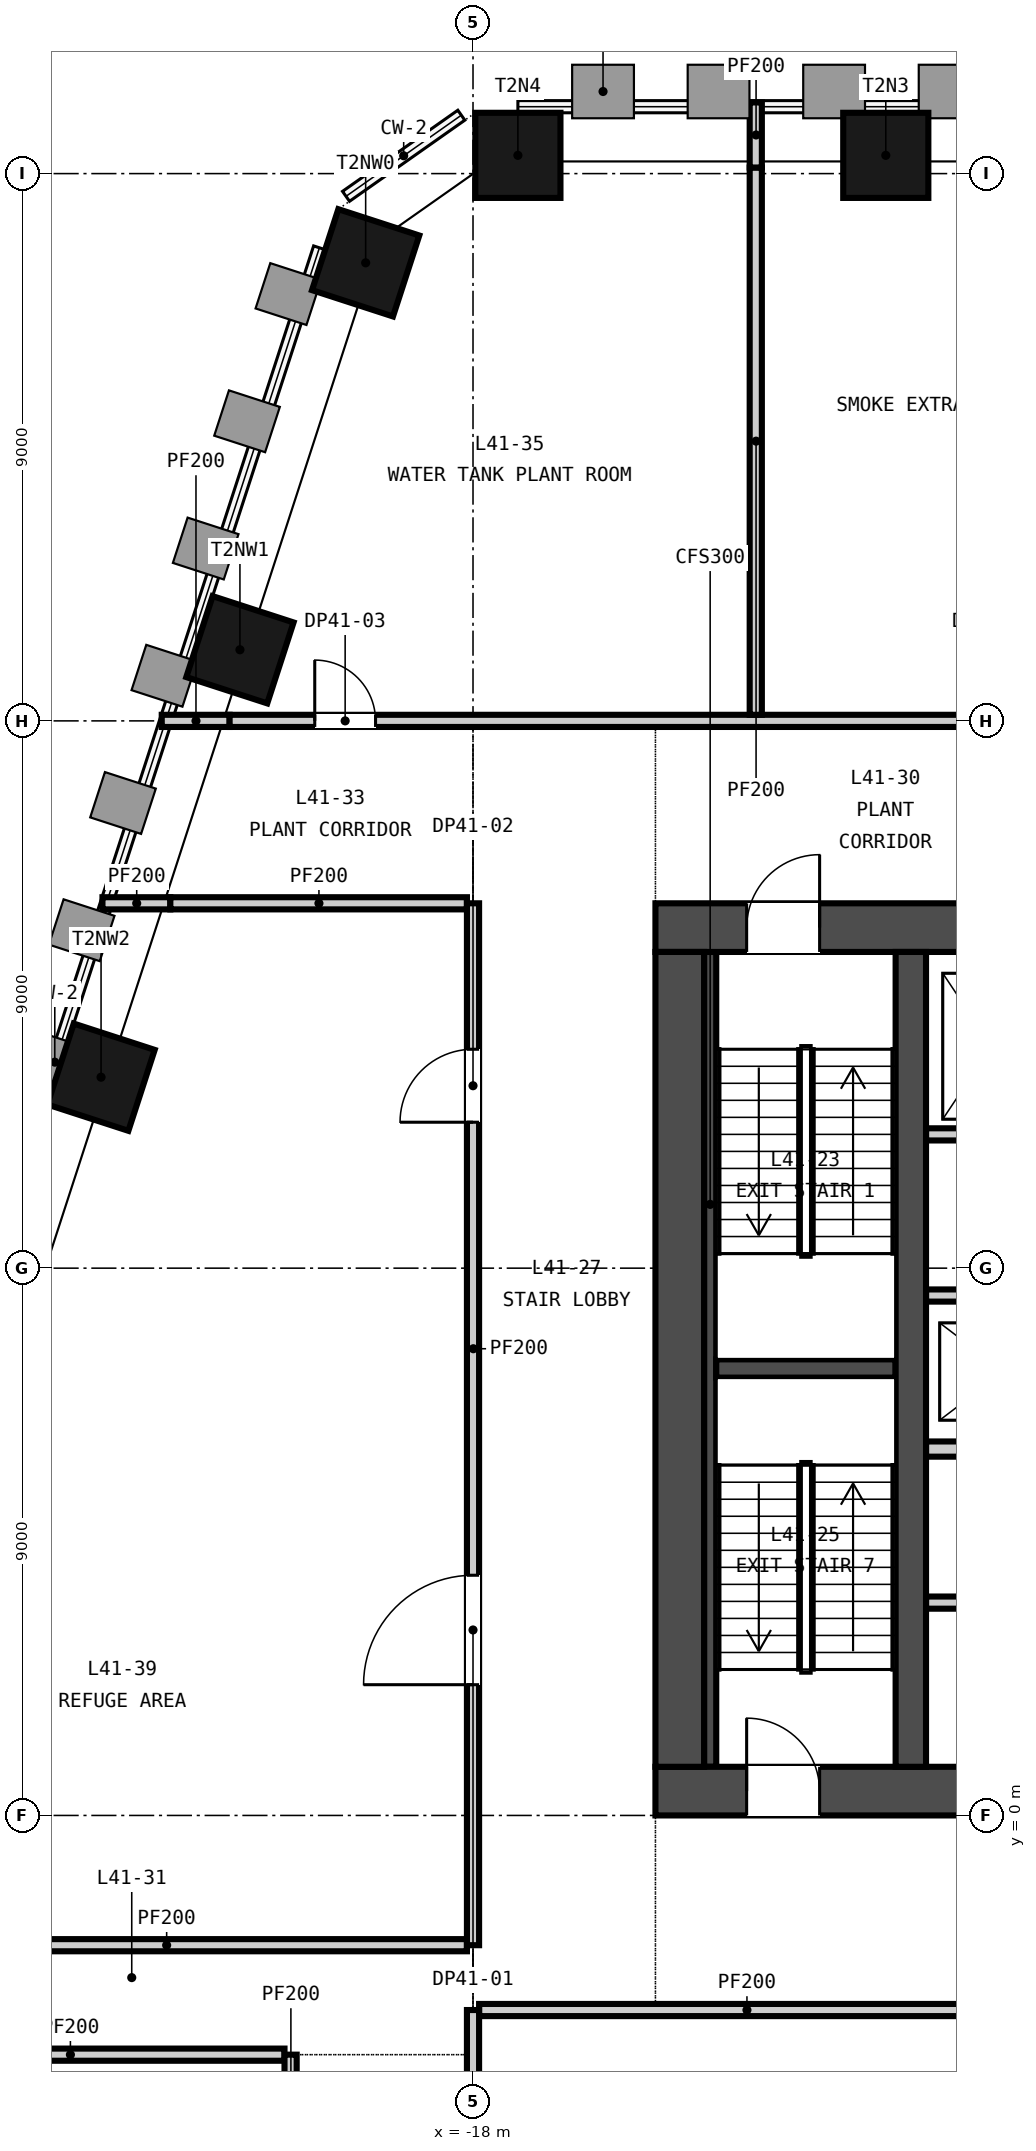
"""IFC4 building model, lengths in metres.
Left out: names, types, materials, properties, quantities, classifications, styles, units other than length and angle.
Written with IfcOpenShell. Run it as: python <this file> out.ifc"""

import sys

from ifc_helpers import new_model, si_unit, direction, frame, frame_2d, origin, origin_2d, place, context, subcontext, project, spatial, rectangle, extrude, element, fill, save


model = new_model("IFC4")
c1 = context("Model", 3, precision=1e-05, world=origin(), true_north=direction((0.0, 1.0)))
c2 = subcontext(c1, "Body", "Model", "MODEL_VIEW")
j1 = project(units=[si_unit("LENGTHUNIT", "METRE"), si_unit("PLANEANGLEUNIT", "RADIAN")], contexts=[c1])
p1 = place(None, origin())
s1 = spatial("IfcSite", under=j1, at=p1, CompositionType="ELEMENT")
p2 = place(p1, origin())
s2 = spatial("IfcBuilding", under=s1, at=p2, CompositionType="ELEMENT")
p3 = place(p2, frame((0.0, 0.0, 166.3)))
s3 = spatial("IfcBuildingStorey", under=s2, at=p3, CompositionType="ELEMENT", Elevation=166.3)
p4 = place(p3, frame((-15.0, 0.4, -0.3), z_axis=(0.0, 0.0, 1.0), x_axis=(1.0, 0.0, 0.0)))
e1 = element("IfcWall", 1, at=p4, inside=s3, PredefinedType="SOLIDWALL", context=c2, shape_type="SweptSolid", body=[
    extrude(rectangle(XDim=30.0, YDim=0.8, at=frame_2d((15.0, 0.0))), origin(), (0.0, 0.0, 1.0), 4.65),
])
p5 = place(p4, frame((5.8, 0.0, 0.3)))
e2 = element("IfcOpeningElement", 2, at=p5, cuts=e1, PredefinedType="OPENING", context=c2, shape_type="SweptSolid", body=[
    extrude(rectangle(XDim=2.4, YDim=2.4, at=frame_2d((1.2, 1.2))), frame((0.0, 0.41, 0.0), z_axis=(0.0, -1.0, 0.0), x_axis=(1.0, 0.0, 0.0)), (0.0, 0.0, 1.0), 0.82),
])
p6 = place(p4, frame((13.8, 0.0, 0.3)))
e3 = element("IfcOpeningElement", 3, at=p6, cuts=e1, PredefinedType="OPENING", context=c2, shape_type="SweptSolid", body=[
    extrude(rectangle(XDim=2.4, YDim=2.4, at=frame_2d((1.2, 1.2))), frame((0.0, 0.41, 0.0), z_axis=(0.0, -1.0, 0.0), x_axis=(1.0, 0.0, 0.0)), (0.0, 0.0, 1.0), 0.82),
])
p7 = place(p4, frame((21.8, 0.0, 0.3)))
e4 = element("IfcOpeningElement", 4, at=p7, cuts=e1, PredefinedType="OPENING", context=c2, shape_type="SweptSolid", body=[
    extrude(rectangle(XDim=2.4, YDim=2.4, at=frame_2d((1.2, 1.2))), frame((0.0, 0.41, 0.0), z_axis=(0.0, -1.0, 0.0), x_axis=(1.0, 0.0, 0.0)), (0.0, 0.0, 1.0), 0.82),
])
p8 = place(p4, frame((1.5, 0.0, 0.3)))
e5 = element("IfcOpeningElement", 5, at=p8, cuts=e1, PredefinedType="OPENING", context=c2, shape_type="SweptSolid", body=[
    extrude(rectangle(XDim=1.2, YDim=2.1, at=frame_2d((0.6, 1.05))), frame((0.0, 0.41, 0.0), z_axis=(0.0, -1.0, 0.0), x_axis=(1.0, 0.0, 0.0)), (0.0, 0.0, 1.0), 0.82),
])
p9 = place(p4, frame((27.3, 0.0, 0.3)))
e6 = element("IfcOpeningElement", 6, at=p9, cuts=e1, PredefinedType="OPENING", context=c2, shape_type="SweptSolid", body=[
    extrude(rectangle(XDim=1.2, YDim=2.1, at=frame_2d((0.6, 1.05))), frame((0.0, 0.41, 0.0), z_axis=(0.0, -1.0, 0.0), x_axis=(1.0, 0.0, 0.0)), (0.0, 0.0, 1.0), 0.82),
])
p10 = place(p3, frame((-15.0, 14.6, -0.3), z_axis=(0.0, 0.0, 1.0), x_axis=(1.0, 0.0, 0.0)))
e7 = element("IfcWall", 7, at=p10, inside=s3, PredefinedType="SOLIDWALL", context=c2, shape_type="SweptSolid", body=[
    extrude(rectangle(XDim=30.0, YDim=0.8, at=frame_2d((15.0, 0.0))), origin(), (0.0, 0.0, 1.0), 4.65),
])
p11 = place(p10, frame((9.25, 0.0, 0.3)))
e8 = element("IfcOpeningElement", 8, at=p11, cuts=e7, PredefinedType="OPENING", context=c2, shape_type="SweptSolid", body=[
    extrude(rectangle(XDim=1.5, YDim=2.1, at=frame_2d((0.75, 1.05))), frame((0.0, 0.41, 0.0), z_axis=(0.0, -1.0, 0.0), x_axis=(1.0, 0.0, 0.0)), (0.0, 0.0, 1.0), 0.82),
])
p12 = place(p10, frame((19.4, 0.0, 0.3)))
e9 = element("IfcOpeningElement", 9, at=p12, cuts=e7, PredefinedType="OPENING", context=c2, shape_type="SweptSolid", body=[
    extrude(rectangle(XDim=1.5, YDim=2.1, at=frame_2d((0.75, 1.05))), frame((0.0, 0.41, 0.0), z_axis=(0.0, -1.0, 0.0), x_axis=(1.0, 0.0, 0.0)), (0.0, 0.0, 1.0), 0.82),
])
p13 = place(p10, frame((1.5, 0.0, 0.3)))
e10 = element("IfcOpeningElement", 10, at=p13, cuts=e7, PredefinedType="OPENING", context=c2, shape_type="SweptSolid", body=[
    extrude(rectangle(XDim=1.2, YDim=2.1, at=frame_2d((0.6, 1.05))), frame((0.0, 0.41, 0.0), z_axis=(0.0, -1.0, 0.0), x_axis=(1.0, 0.0, 0.0)), (0.0, 0.0, 1.0), 0.82),
])
p14 = place(p10, frame((27.3, 0.0, 0.3)))
e11 = element("IfcOpeningElement", 11, at=p14, cuts=e7, PredefinedType="OPENING", context=c2, shape_type="SweptSolid", body=[
    extrude(rectangle(XDim=1.2, YDim=2.1, at=frame_2d((0.6, 1.05))), frame((0.0, 0.41, 0.0), z_axis=(0.0, -1.0, 0.0), x_axis=(1.0, 0.0, 0.0)), (0.0, 0.0, 1.0), 0.82),
])
p15 = place(p3, frame((-14.6, 0.8, -0.3), z_axis=(0.0, 0.0, 1.0), x_axis=(0.0, 1.0, 0.0)))
e12 = element("IfcWall", 12, at=p15, inside=s3, PredefinedType="SOLIDWALL", context=c2, shape_type="SweptSolid", body=[
    extrude(rectangle(XDim=13.4, YDim=0.8, at=frame_2d((6.7, 0.0))), origin(), (0.0, 0.0, 1.0), 4.65),
])
p16 = place(p3, frame((-10.8, 0.8, -0.3), z_axis=(0.0, 0.0, 1.0), x_axis=(0.0, 1.0, 0.0)))
e13 = element("IfcWall", 13, at=p16, inside=s3, PredefinedType="SOLIDWALL", context=c2, shape_type="SweptSolid", body=[
    extrude(rectangle(XDim=13.4, YDim=0.5, at=frame_2d((6.7, 0.0))), origin(), (0.0, 0.0, 1.0), 4.65),
])
for number, where, z_axis, x_axis in (
    (14, (-11.212, 27.3, -0.3), (0.0, 0.0, 1.0), (-1.0, 0.0, 0.0)),
    (15, (-17.262, 27.3, -0.3), (0.0, 0.0, 1.0), (-1.0, 0.0, 0.0)),
    (16, (-19.765, 25.533, -0.3), (0.0, 0.0, 1.0), (-0.309, -0.951, 0.0)),
    (17, (-21.833, 19.17, -0.3), (0.0, 0.0, 1.0), (-0.309, -0.951, 0.0)),
    (18, (-24.117, 12.141, -0.3), (0.0, 0.0, 1.0), (-0.309, -0.951, 0.0)),
):
    element("IfcColumn", number, at=place(p3, frame(where, z_axis=z_axis, x_axis=x_axis)), inside=s3, PredefinedType="COLUMN", context=c2, shape_type="SweptSolid", body=[
        extrude(rectangle(XDim=1.4, YDim=1.4, at=origin_2d()), origin(), (0.0, 0.0, 1.0), 4.65),
    ])
p17 = place(p3, frame((-10.55, 3.5, 0.0), z_axis=(0.0, 0.0, 1.0), x_axis=(1.0, 0.0, 0.0)))
e19 = element("IfcWall", 19, at=p17, inside=s3, PredefinedType="PARTITIONING", context=c2, shape_type="SweptSolid", body=[
    extrude(rectangle(XDim=21.1, YDim=0.2, at=frame_2d((10.55, 0.0))), origin(), (0.0, 0.0, 1.0), 4.35),
])
p18 = place(p17, frame((1.262, 0.0, 0.0)))
e20 = element("IfcOpeningElement", 20, at=p18, cuts=e19, PredefinedType="OPENING", context=c2, shape_type="SweptSolid", body=[
    extrude(rectangle(XDim=1.0, YDim=2.1, at=frame_2d((0.5, 1.05))), frame((0.0, 0.11, 0.0), z_axis=(0.0, -1.0, 0.0), x_axis=(1.0, 0.0, 0.0)), (0.0, 0.0, 1.0), 0.22),
])
p19 = place(p17, frame((5.8, 0.0, 0.0)))
e21 = element("IfcOpeningElement", 21, at=p19, cuts=e19, PredefinedType="OPENING", context=c2, shape_type="SweptSolid", body=[
    extrude(rectangle(XDim=1.0, YDim=2.1, at=frame_2d((0.5, 1.05))), frame((0.0, 0.11, 0.0), z_axis=(0.0, -1.0, 0.0), x_axis=(1.0, 0.0, 0.0)), (0.0, 0.0, 1.0), 0.22),
])
p20 = place(p17, frame((13.712, 0.0, 0.0)))
e22 = element("IfcOpeningElement", 22, at=p20, cuts=e19, PredefinedType="OPENING", context=c2, shape_type="SweptSolid", body=[
    extrude(rectangle(XDim=1.0, YDim=2.1, at=frame_2d((0.5, 1.05))), frame((0.0, 0.11, 0.0), z_axis=(0.0, -1.0, 0.0), x_axis=(1.0, 0.0, 0.0)), (0.0, 0.0, 1.0), 0.22),
])
p21 = place(p17, frame((19.9, 0.0, 0.0)))
e23 = element("IfcOpeningElement", 23, at=p21, cuts=e19, PredefinedType="OPENING", context=c2, shape_type="SweptSolid", body=[
    extrude(rectangle(XDim=0.9, YDim=2.1, at=frame_2d((0.45, 1.05))), frame((0.0, 0.11, 0.0), z_axis=(0.0, -1.0, 0.0), x_axis=(1.0, 0.0, 0.0)), (0.0, 0.0, 1.0), 0.22),
])
p22 = place(p3, frame((-10.55, 6.025, 0.0), z_axis=(0.0, 0.0, 1.0), x_axis=(1.0, 0.0, 0.0)))
e24 = element("IfcWall", 24, at=p22, inside=s3, PredefinedType="PARTITIONING", context=c2, shape_type="SweptSolid", body=[
    extrude(rectangle(XDim=21.1, YDim=0.25, at=frame_2d((10.55, 0.0))), origin(), (0.0, 0.0, 1.0), 4.35),
])
p23 = place(p3, frame((-10.55, 8.55, 0.0), z_axis=(0.0, 0.0, 1.0), x_axis=(1.0, 0.0, 0.0)))
e25 = element("IfcWall", 25, at=p23, inside=s3, PredefinedType="PARTITIONING", context=c2, shape_type="SweptSolid", body=[
    extrude(rectangle(XDim=21.1, YDim=0.2, at=frame_2d((10.55, 0.0))), origin(), (0.0, 0.0, 1.0), 4.35),
])
p24 = place(p23, frame((19.9, 0.0, 0.0)))
e26 = element("IfcOpeningElement", 26, at=p24, cuts=e25, PredefinedType="OPENING", context=c2, shape_type="SweptSolid", body=[
    extrude(rectangle(XDim=0.9, YDim=2.1, at=frame_2d((0.45, 1.05))), frame((0.0, 0.11, 0.0), z_axis=(0.0, -1.0, 0.0), x_axis=(1.0, 0.0, 0.0)), (0.0, 0.0, 1.0), 0.22),
])
p25 = place(p3, frame((-10.55, 11.2, 0.0), z_axis=(0.0, 0.0, 1.0), x_axis=(1.0, 0.0, 0.0)))
e27 = element("IfcWall", 27, at=p25, inside=s3, PredefinedType="PARTITIONING", context=c2, shape_type="SweptSolid", body=[
    extrude(rectangle(XDim=4.8, YDim=0.2, at=frame_2d((2.4, 0.0))), origin(), (0.0, 0.0, 1.0), 4.35),
])
p26 = place(p25, frame((0.525, 0.0, 0.0)))
e28 = element("IfcOpeningElement", 28, at=p26, cuts=e27, PredefinedType="OPENING", context=c2, shape_type="SweptSolid", body=[
    extrude(rectangle(XDim=1.1, YDim=2.1, at=frame_2d((0.55, 1.05))), frame((0.0, 0.11, 0.0), z_axis=(0.0, -1.0, 0.0), x_axis=(1.0, 0.0, 0.0)), (0.0, 0.0, 1.0), 0.22),
])
p27 = place(p25, frame((2.925, 0.0, 0.0)))
e29 = element("IfcOpeningElement", 29, at=p27, cuts=e27, PredefinedType="OPENING", context=c2, shape_type="SweptSolid", body=[
    extrude(rectangle(XDim=1.1, YDim=2.1, at=frame_2d((0.55, 1.05))), frame((0.0, 0.11, 0.0), z_axis=(0.0, -1.0, 0.0), x_axis=(1.0, 0.0, 0.0)), (0.0, 0.0, 1.0), 0.22),
])
p28 = place(p3, frame((-14.0, 7.35, 0.0), z_axis=(0.0, 0.0, 1.0), x_axis=(1.0, 0.0, 0.0)))
e30 = element("IfcWall", 30, at=p28, inside=s3, PredefinedType="SOLIDWALL", context=c2, shape_type="SweptSolid", body=[
    extrude(rectangle(XDim=2.95, YDim=0.3, at=frame_2d((1.475, 0.0))), origin(), (0.0, 0.0, 1.0), 4.35),
])
p29 = place(p3, frame((-14.1, 0.8, 0.0), z_axis=(0.0, 0.0, 1.0), x_axis=(0.0, 1.0, 0.0)))
e31 = element("IfcWall", 31, at=p29, inside=s3, PredefinedType="SOLIDWALL", context=c2, shape_type="SweptSolid", body=[
    extrude(rectangle(XDim=13.4, YDim=0.2, at=frame_2d((6.7, 0.0))), origin(), (0.0, 0.0, 1.0), 4.35),
])
p30 = place(p3, frame((-28.152, -3.934, 0.0), z_axis=(0.0, 0.0, 1.0), x_axis=(1.0, 0.0, 0.0)))
e32 = element("IfcWall", 32, at=p30, inside=s3, PredefinedType="PARTITIONING", context=c2, shape_type="SweptSolid", body=[
    extrude(rectangle(XDim=7.052, YDim=0.2, at=frame_2d((3.526, 0.0))), origin(), (0.0, 0.0, 1.0), 4.35),
])
p31 = place(p3, frame((-17.9, -3.2, 0.0), z_axis=(0.0, 0.0, 1.0), x_axis=(1.0, 0.0, 0.0)))
e33 = element("IfcWall", 33, at=p31, inside=s3, PredefinedType="PARTITIONING", context=c2, shape_type="SweptSolid", body=[
    extrude(rectangle(XDim=8.8, YDim=0.2, at=frame_2d((4.4, 0.0))), origin(), (0.0, 0.0, 1.0), 4.35),
])
p32 = place(p3, frame((-27.986, -2.134, 0.0), z_axis=(0.0, 0.0, 1.0), x_axis=(1.0, 0.0, 0.0)))
e34 = element("IfcWall", 34, at=p32, inside=s3, PredefinedType="PARTITIONING", context=c2, shape_type="SweptSolid", body=[
    extrude(rectangle(XDim=9.886, YDim=0.2, at=frame_2d((4.943, 0.0))), origin(), (0.0, 0.0, 1.0), 4.35),
])
p33 = place(p3, frame((-24.094, 15.0, 0.0), z_axis=(0.0, 0.0, 1.0), x_axis=(1.0, 0.0, 0.0)))
e35 = element("IfcWall", 35, at=p33, inside=s3, PredefinedType="PARTITIONING", context=c2, shape_type="SweptSolid", body=[
    extrude(rectangle(XDim=1.116, YDim=0.2, at=frame_2d((0.558, 0.0))), origin(), (0.0, 0.0, 1.0), 3.6),
])
p34 = place(p3, frame((-22.978, 15.0, 0.0), z_axis=(0.0, 0.0, 1.0), x_axis=(1.0, 0.0, 0.0)))
e36 = element("IfcWall", 36, at=p34, inside=s3, PredefinedType="PARTITIONING", context=c2, shape_type="SweptSolid", body=[
    extrude(rectangle(XDim=4.877, YDim=0.2, at=frame_2d((2.439, 0.0))), origin(), (0.0, 0.0, 1.0), 4.35),
])
p35 = place(p3, frame((-23.119, 18.0, 0.0), z_axis=(0.0, 0.0, 1.0), x_axis=(1.0, 0.0, 0.0)))
e37 = element("IfcWall", 37, at=p35, inside=s3, PredefinedType="PARTITIONING", context=c2, shape_type="SweptSolid", body=[
    extrude(rectangle(XDim=1.116, YDim=0.2, at=frame_2d((0.558, 0.0))), origin(), (0.0, 0.0, 1.0), 3.6),
])
p36 = place(p3, frame((-22.003, 18.0, 0.0), z_axis=(0.0, 0.0, 1.0), x_axis=(1.0, 0.0, 0.0)))
e38 = element("IfcWall", 38, at=p36, inside=s3, PredefinedType="PARTITIONING", context=c2, shape_type="SweptSolid", body=[
    extrude(rectangle(XDim=41.843, YDim=0.2, at=frame_2d((20.921, 0.0))), origin(), (0.0, 0.0, 1.0), 4.35),
])
p37 = place(p36, frame((1.4, 0.0, 0.0)))
e39 = element("IfcOpeningElement", 39, at=p37, cuts=e38, PredefinedType="OPENING", context=c2, shape_type="SweptSolid", body=[
    extrude(rectangle(XDim=1.0, YDim=2.1, at=frame_2d((0.5, 1.05))), frame((0.0, 0.11, 0.0), z_axis=(0.0, -1.0, 0.0), x_axis=(1.0, 0.0, 0.0)), (0.0, 0.0, 1.0), 0.22),
])
p38 = place(p36, frame((12.052, 0.0, 0.0)))
e40 = element("IfcOpeningElement", 40, at=p38, cuts=e38, PredefinedType="OPENING", context=c2, shape_type="SweptSolid", body=[
    extrude(rectangle(XDim=1.0, YDim=2.1, at=frame_2d((0.5, 1.05))), frame((0.0, 0.11, 0.0), z_axis=(0.0, -1.0, 0.0), x_axis=(1.0, 0.0, 0.0)), (0.0, 0.0, 1.0), 0.22),
])
p39 = place(p36, frame((22.802, 0.0, 0.0)))
e41 = element("IfcOpeningElement", 41, at=p39, cuts=e38, PredefinedType="OPENING", context=c2, shape_type="SweptSolid", body=[
    extrude(rectangle(XDim=1.0, YDim=2.1, at=frame_2d((0.5, 1.05))), frame((0.0, 0.11, 0.0), z_axis=(0.0, -1.0, 0.0), x_axis=(1.0, 0.0, 0.0)), (0.0, 0.0, 1.0), 0.22),
])
p40 = place(p36, frame((33.092, 0.0, 0.0)))
e42 = element("IfcOpeningElement", 42, at=p40, cuts=e38, PredefinedType="OPENING", context=c2, shape_type="SweptSolid", body=[
    extrude(rectangle(XDim=1.0, YDim=2.1, at=frame_2d((0.5, 1.05))), frame((0.0, 0.11, 0.0), z_axis=(0.0, -1.0, 0.0), x_axis=(1.0, 0.0, 0.0)), (0.0, 0.0, 1.0), 0.22),
])
p41 = place(p3, frame((-21.0, -13.486, 0.0), z_axis=(0.0, 0.0, 1.0), x_axis=(0.0, 1.0, 0.0)))
e43 = element("IfcWall", 43, at=p41, inside=s3, PredefinedType="PARTITIONING", context=c2, shape_type="SweptSolid", body=[
    extrude(rectangle(XDim=9.552, YDim=0.2, at=frame_2d((4.776, 0.0))), origin(), (0.0, 0.0, 1.0), 3.601),
])
p42 = place(p3, frame((-18.0, -18.47, 0.0), z_axis=(0.0, 0.0, 1.0), x_axis=(0.0, 1.0, 0.0)))
e44 = element("IfcWall", 44, at=p42, inside=s3, PredefinedType="PARTITIONING", context=c2, shape_type="SweptSolid", body=[
    extrude(rectangle(XDim=15.27, YDim=0.2, at=frame_2d((7.635, 0.0))), origin(), (0.0, 0.0, 1.0), 4.35),
])
p43 = place(p42, frame((0.9, 0.0, 0.0)))
e45 = element("IfcOpeningElement", 45, at=p43, cuts=e44, PredefinedType="OPENING", context=c2, shape_type="SweptSolid", body=[
    extrude(rectangle(XDim=1.0, YDim=2.1, at=frame_2d((0.5, 1.05))), frame((0.0, 0.11, 0.0), z_axis=(0.0, -1.0, 0.0), x_axis=(1.0, 0.0, 0.0)), (0.0, 0.0, 1.0), 0.22),
])
p44 = place(p3, frame((-18.0, -2.134, 0.0), z_axis=(0.0, 0.0, 1.0), x_axis=(0.0, 1.0, 0.0)))
e46 = element("IfcWall", 46, at=p44, inside=s3, PredefinedType="PARTITIONING", context=c2, shape_type="SweptSolid", body=[
    extrude(rectangle(XDim=17.134, YDim=0.2, at=frame_2d((8.567, 0.0))), origin(), (0.0, 0.0, 1.0), 4.35),
])
p45 = place(p44, frame((4.284, 0.0, 0.0)))
e47 = element("IfcOpeningElement", 47, at=p45, cuts=e46, PredefinedType="OPENING", context=c2, shape_type="SweptSolid", body=[
    extrude(rectangle(XDim=1.8, YDim=2.4, at=frame_2d((0.9, 1.2))), frame((0.0, 0.11, 0.0), z_axis=(0.0, -1.0, 0.0), x_axis=(1.0, 0.0, 0.0)), (0.0, 0.0, 1.0), 0.22),
])
p46 = place(p44, frame((13.534, 0.0, 0.0)))
e48 = element("IfcOpeningElement", 48, at=p46, cuts=e46, PredefinedType="OPENING", context=c2, shape_type="SweptSolid", body=[
    extrude(rectangle(XDim=1.2, YDim=2.1, at=frame_2d((0.6, 1.05))), frame((0.0, 0.11, 0.0), z_axis=(0.0, -1.0, 0.0), x_axis=(1.0, 0.0, 0.0)), (0.0, 0.0, 1.0), 0.22),
])
p47 = place(p3, frame((-13.35, 18.1, 0.0), z_axis=(0.0, 0.0, 1.0), x_axis=(0.0, 1.0, 0.0)))
e49 = element("IfcWall", 49, at=p47, inside=s3, PredefinedType="PARTITIONING", context=c2, shape_type="SweptSolid", body=[
    extrude(rectangle(XDim=9.0, YDim=0.2, at=frame_2d((4.5, 0.0))), origin(), (0.0, 0.0, 1.0), 4.35),
])
p48 = place(p3, frame((-13.35, 27.1, 0.0), z_axis=(0.0, 0.0, 1.0), x_axis=(0.0, 1.0, 0.0)))
e50 = element("IfcWall", 50, at=p48, inside=s3, PredefinedType="PARTITIONING", context=c2, shape_type="SweptSolid", body=[
    extrude(rectangle(XDim=1.07, YDim=0.2, at=frame_2d((0.535, 0.0))), origin(), (0.0, 0.0, 1.0), 3.6),
])
p49 = place(p13, origin())
e51 = element("IfcDoor", 51, at=p49, inside=s3, OperationType="SINGLE_SWING_RIGHT", PredefinedType="DOOR", context=c2, shape_type="SweptSolid", body=[
    extrude(rectangle(XDim=1.2, YDim=2.1, at=frame_2d((0.6, 1.05))), frame((0.0, 0.025, 0.0), z_axis=(0.0, -1.0, 0.0), x_axis=(1.0, 0.0, 0.0)), (0.0, 0.0, 1.0), 0.05),
])
fill(e10, e51)
p50 = place(p8, origin())
e52 = element("IfcDoor", 52, at=p50, inside=s3, OperationType="SINGLE_SWING_LEFT", PredefinedType="DOOR", context=c2, shape_type="SweptSolid", body=[
    extrude(rectangle(XDim=1.2, YDim=2.1, at=frame_2d((0.6, 1.05))), frame((0.0, 0.025, 0.0), z_axis=(0.0, -1.0, 0.0), x_axis=(1.0, 0.0, 0.0)), (0.0, 0.0, 1.0), 0.05),
])
fill(e5, e52)
p51 = place(p45, origin())
e53 = element("IfcDoor", 53, at=p51, inside=s3, OperationType="SINGLE_SWING_LEFT", PredefinedType="DOOR", context=c2, shape_type="SweptSolid", body=[
    extrude(rectangle(XDim=1.8, YDim=2.4, at=frame_2d((0.9, 1.2))), frame((0.0, 0.025, 0.0), z_axis=(0.0, -1.0, 0.0), x_axis=(1.0, 0.0, 0.0)), (0.0, 0.0, 1.0), 0.05),
])
fill(e47, e53)
p52 = place(p46, origin())
e54 = element("IfcDoor", 54, at=p52, inside=s3, OperationType="SINGLE_SWING_LEFT", PredefinedType="DOOR", context=c2, shape_type="SweptSolid", body=[
    extrude(rectangle(XDim=1.2, YDim=2.1, at=frame_2d((0.6, 1.05))), frame((0.0, 0.025, 0.0), z_axis=(0.0, -1.0, 0.0), x_axis=(1.0, 0.0, 0.0)), (0.0, 0.0, 1.0), 0.05),
])
fill(e48, e54)
p53 = place(p37, origin())
e55 = element("IfcDoor", 55, at=p53, inside=s3, OperationType="SINGLE_SWING_LEFT", PredefinedType="DOOR", context=c2, shape_type="SweptSolid", body=[
    extrude(rectangle(XDim=1.0, YDim=2.1, at=frame_2d((0.5, 1.05))), frame((0.0, 0.025, 0.0), z_axis=(0.0, -1.0, 0.0), x_axis=(1.0, 0.0, 0.0)), (0.0, 0.0, 1.0), 0.05),
])
fill(e39, e55)
save(model, sys.argv[1])
